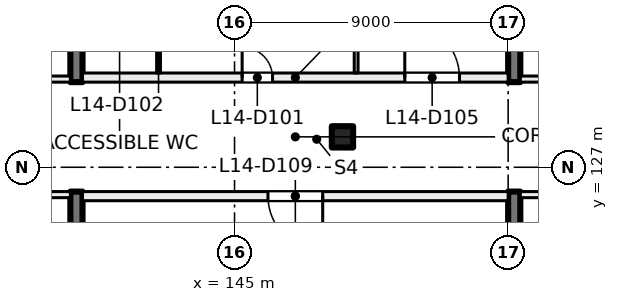
"""IFC4 building model, lengths in metres.
Left out: names, types, materials, properties, quantities, classifications, styles, units other than length and angle.
Written with IfcOpenShell. Run it as: python <this file> out.ifc"""

import sys

from ifc_helpers import new_model, si_unit, direction, frame, frame_2d, origin, origin_2d, place, context, subcontext, project, spatial, rectangle, extrude, element, fill, save


model = new_model("IFC4")
c1 = context("Model", 3, precision=1e-05, world=origin(), true_north=direction((0.0, 1.0)))
c2 = subcontext(c1, "Body", "Model", "MODEL_VIEW")
j1 = project(units=[si_unit("LENGTHUNIT", "METRE"), si_unit("PLANEANGLEUNIT", "RADIAN")], contexts=[c1])
p1 = place(None, origin())
s1 = spatial("IfcSite", under=j1, at=p1, CompositionType="ELEMENT")
p2 = place(p1, origin())
s2 = spatial("IfcBuilding", under=s1, at=p2, CompositionType="ELEMENT")
p3 = place(p2, frame((0.0, 0.0, 63.5)))
s3 = spatial("IfcBuildingStorey", under=s2, at=p3, CompositionType="ELEMENT", Elevation=63.5)
p4 = place(p3, frame((148.55, 128.0, 0.0), z_axis=(0.0, 0.0, 1.0), x_axis=(1.0, 0.0, 0.0)))
e1 = element("IfcColumn", 1, at=p4, inside=s3, PredefinedType="COLUMN", context=c2, shape_type="SweptSolid", body=[
    extrude(rectangle(XDim=0.7, YDim=0.7, at=origin_2d()), origin(), (0.0, 0.0, 1.0), 4.0),
])
for number, where, z_axis, x_axis in (
    (2, (139.8, 117.6, 0.0), (0.0, 0.0, 1.0), (0.0, 1.0, 0.0)),
    (3, (139.8, 129.8, 0.0), (0.0, 0.0, 1.0), (0.0, 1.0, 0.0)),
    (4, (154.2, 138.4, 0.0), (0.0, 0.0, 1.0), (0.0, -1.0, 0.0)),
    (5, (154.2, 126.2, 0.0), (0.0, 0.0, 1.0), (0.0, -1.0, 0.0)),
):
    element("IfcWall", number, at=place(p3, frame(where, z_axis=z_axis, x_axis=x_axis)), inside=s3, PredefinedType="SHEAR", context=c2, shape_type="SweptSolid", body=[
        extrude(rectangle(XDim=8.6, YDim=0.4, at=frame_2d((4.3, 0.0))), origin(), (0.0, 0.0, 1.0), 4.0),
    ])
p5 = place(p3, frame((135.0, 129.9, 0.0), z_axis=(0.0, 0.0, 1.0), x_axis=(1.0, 0.0, 0.0)))
e6 = element("IfcWall", 6, at=p5, inside=s3, PredefinedType="PARTITIONING", context=c2, shape_type="SweptSolid", body=[
    extrude(rectangle(XDim=4.6, YDim=0.2, at=frame_2d((2.3, 0.0))), origin(), (0.0, 0.0, 1.0), 3.625),
])
p6 = place(p5, frame((1.7, 0.0, 0.0)))
e7 = element("IfcOpeningElement", 7, at=p6, cuts=e6, PredefinedType="OPENING", context=c2, shape_type="SweptSolid", body=[
    extrude(rectangle(XDim=1.2, YDim=2.1, at=frame_2d((0.6, 1.05))), frame((0.0, 0.11, 0.0), z_axis=(0.0, -1.0, 0.0), x_axis=(1.0, 0.0, 0.0)), (0.0, 0.0, 1.0), 0.22),
])
p7 = place(p3, frame((139.6, 126.1, 0.0), z_axis=(0.0, 0.0, 1.0), x_axis=(-1.0, 0.0, 0.0)))
e8 = element("IfcWall", 8, at=p7, inside=s3, PredefinedType="PARTITIONING", context=c2, shape_type="SweptSolid", body=[
    extrude(rectangle(XDim=4.6, YDim=0.2, at=frame_2d((2.3, 0.0))), origin(), (0.0, 0.0, 1.0), 3.625),
])
p8 = place(p7, frame((1.7, 0.0, 0.0)))
e9 = element("IfcOpeningElement", 9, at=p8, cuts=e8, PredefinedType="OPENING", context=c2, shape_type="SweptSolid", body=[
    extrude(rectangle(XDim=1.2, YDim=2.1, at=frame_2d((0.6, 1.05))), frame((0.0, 0.11, 0.0), z_axis=(0.0, -1.0, 0.0), x_axis=(1.0, 0.0, 0.0)), (0.0, 0.0, 1.0), 0.22),
])
p9 = place(p3, frame((163.8, 126.1, 0.0), z_axis=(0.0, 0.0, 1.0), x_axis=(-1.0, 0.0, 0.0)))
e10 = element("IfcWall", 10, at=p9, inside=s3, PredefinedType="PARTITIONING", context=c2, shape_type="SweptSolid", body=[
    extrude(rectangle(XDim=9.4, YDim=0.2, at=frame_2d((4.7, 0.0))), origin(), (0.0, 0.0, 1.0), 3.625),
])
p10 = place(p9, frame((4.1, 0.0, 0.0)))
e11 = element("IfcOpeningElement", 11, at=p10, cuts=e10, PredefinedType="OPENING", context=c2, shape_type="SweptSolid", body=[
    extrude(rectangle(XDim=1.2, YDim=2.1, at=frame_2d((0.6, 1.05))), frame((0.0, 0.11, 0.0), z_axis=(0.0, -1.0, 0.0), x_axis=(1.0, 0.0, 0.0)), (0.0, 0.0, 1.0), 0.22),
])
p11 = place(p3, frame((154.4, 129.9, 0.0), z_axis=(0.0, 0.0, 1.0), x_axis=(1.0, 0.0, 0.0)))
e12 = element("IfcWall", 12, at=p11, inside=s3, PredefinedType="PARTITIONING", context=c2, shape_type="SweptSolid", body=[
    extrude(rectangle(XDim=9.4, YDim=0.2, at=frame_2d((4.7, 0.0))), origin(), (0.0, 0.0, 1.0), 3.625),
])
p12 = place(p11, frame((4.1, 0.0, 0.0)))
e13 = element("IfcOpeningElement", 13, at=p12, cuts=e12, PredefinedType="OPENING", context=c2, shape_type="SweptSolid", body=[
    extrude(rectangle(XDim=1.2, YDim=2.1, at=frame_2d((0.6, 1.05))), frame((0.0, 0.11, 0.0), z_axis=(0.0, -1.0, 0.0), x_axis=(1.0, 0.0, 0.0)), (0.0, 0.0, 1.0), 0.22),
])
p13 = place(p3, frame((140.0, 129.95, 0.0), z_axis=(0.0, 0.0, 1.0), x_axis=(1.0, 0.0, 0.0)))
e14 = element("IfcWall", 14, at=p13, inside=s3, PredefinedType="PARTITIONING", context=c2, shape_type="SweptSolid", body=[
    extrude(rectangle(XDim=14.0, YDim=0.3, at=frame_2d((7.0, 0.0))), origin(), (0.0, 0.0, 1.0), 3.625),
])
p14 = place(p13, frame((5.25, 0.0, 0.0)))
e15 = element("IfcOpeningElement", 15, at=p14, cuts=e14, PredefinedType="OPENING", context=c2, shape_type="SweptSolid", body=[
    extrude(rectangle(XDim=1.0, YDim=2.1, at=frame_2d((0.5, 1.05))), frame((0.0, 0.16, 0.0), z_axis=(0.0, -1.0, 0.0), x_axis=(1.0, 0.0, 0.0)), (0.0, 0.0, 1.0), 0.32),
])
p15 = place(p13, frame((10.6, 0.0, 0.0)))
e16 = element("IfcOpeningElement", 16, at=p15, cuts=e14, PredefinedType="OPENING", context=c2, shape_type="SweptSolid", body=[
    extrude(rectangle(XDim=1.8, YDim=2.1, at=frame_2d((0.9, 1.05))), frame((0.0, 0.16, 0.0), z_axis=(0.0, -1.0, 0.0), x_axis=(1.0, 0.0, 0.0)), (0.0, 0.0, 1.0), 0.32),
])
p16 = place(p3, frame((142.5, 130.1, 0.0), z_axis=(0.0, 0.0, 1.0), x_axis=(0.0, 1.0, 0.0)))
e17 = element("IfcWall", 17, at=p16, inside=s3, PredefinedType="PARTITIONING", context=c2, shape_type="SweptSolid", body=[
    extrude(rectangle(XDim=2.588, YDim=0.125, at=frame_2d((1.294, 0.0))), origin(), (0.0, 0.0, 1.0), 3.625),
])
p17 = place(p16, frame((0.794, 0.0, 0.0)))
e18 = element("IfcOpeningElement", 18, at=p17, cuts=e17, PredefinedType="OPENING", context=c2, shape_type="SweptSolid", body=[
    extrude(rectangle(XDim=1.0, YDim=2.1, at=frame_2d((0.5, 1.05))), frame((0.0, 0.073, 0.0), z_axis=(0.0, -1.0, 0.0), x_axis=(1.0, 0.0, 0.0)), (0.0, 0.0, 1.0), 0.145),
])
p18 = place(p3, frame((149.0, 139.012, 0.0), z_axis=(0.0, 0.0, 1.0), x_axis=(0.0, -1.0, 0.0)))
e19 = element("IfcWall", 19, at=p18, inside=s3, PredefinedType="PARTITIONING", context=c2, shape_type="SweptSolid", body=[
    extrude(rectangle(XDim=8.912, YDim=0.125, at=frame_2d((4.456, 0.0))), origin(), (0.0, 0.0, 1.0), 3.625),
])
p19 = place(p3, frame((154.0, 126.05, 0.0), z_axis=(0.0, 0.0, 1.0), x_axis=(-1.0, 0.0, 0.0)))
e20 = element("IfcWall", 20, at=p19, inside=s3, PredefinedType="PARTITIONING", context=c2, shape_type="SweptSolid", body=[
    extrude(rectangle(XDim=14.0, YDim=0.3, at=frame_2d((7.0, 0.0))), origin(), (0.0, 0.0, 1.0), 3.625),
])
p20 = place(p19, frame((6.1, 0.0, 0.0)))
e21 = element("IfcOpeningElement", 21, at=p20, cuts=e20, PredefinedType="OPENING", context=c2, shape_type="SweptSolid", body=[
    extrude(rectangle(XDim=1.8, YDim=2.1, at=frame_2d((0.9, 1.05))), frame((0.0, 0.16, 0.0), z_axis=(0.0, -1.0, 0.0), x_axis=(1.0, 0.0, 0.0)), (0.0, 0.0, 1.0), 0.32),
])
p21 = place(p14, origin())
e22 = element("IfcDoor", 22, at=p21, inside=s3, OperationType="SINGLE_SWING_RIGHT", PredefinedType="DOOR", context=c2, shape_type="SweptSolid", body=[
    extrude(rectangle(XDim=1.0, YDim=2.1, at=frame_2d((0.5, 1.05))), frame((0.0, 0.025, 0.0), z_axis=(0.0, -1.0, 0.0), x_axis=(1.0, 0.0, 0.0)), (0.0, 0.0, 1.0), 0.05),
])
fill(e15, e22)
p22 = place(p15, origin())
e23 = element("IfcDoor", 23, at=p22, inside=s3, OperationType="DOUBLE_DOOR_SINGLE_SWING", PredefinedType="DOOR", context=c2, shape_type="SweptSolid", body=[
    extrude(rectangle(XDim=1.8, YDim=2.1, at=frame_2d((0.9, 1.05))), frame((0.0, 0.025, 0.0), z_axis=(0.0, -1.0, 0.0), x_axis=(1.0, 0.0, 0.0)), (0.0, 0.0, 1.0), 0.05),
])
fill(e16, e23)
p23 = place(p20, origin())
e24 = element("IfcDoor", 24, at=p23, inside=s3, OperationType="DOUBLE_DOOR_SINGLE_SWING", PredefinedType="DOOR", context=c2, shape_type="SweptSolid", body=[
    extrude(rectangle(XDim=1.8, YDim=2.1, at=frame_2d((0.9, 1.05))), frame((0.0, 0.025, 0.0), z_axis=(0.0, -1.0, 0.0), x_axis=(1.0, 0.0, 0.0)), (0.0, 0.0, 1.0), 0.05),
])
fill(e21, e24)
save(model, sys.argv[1])
